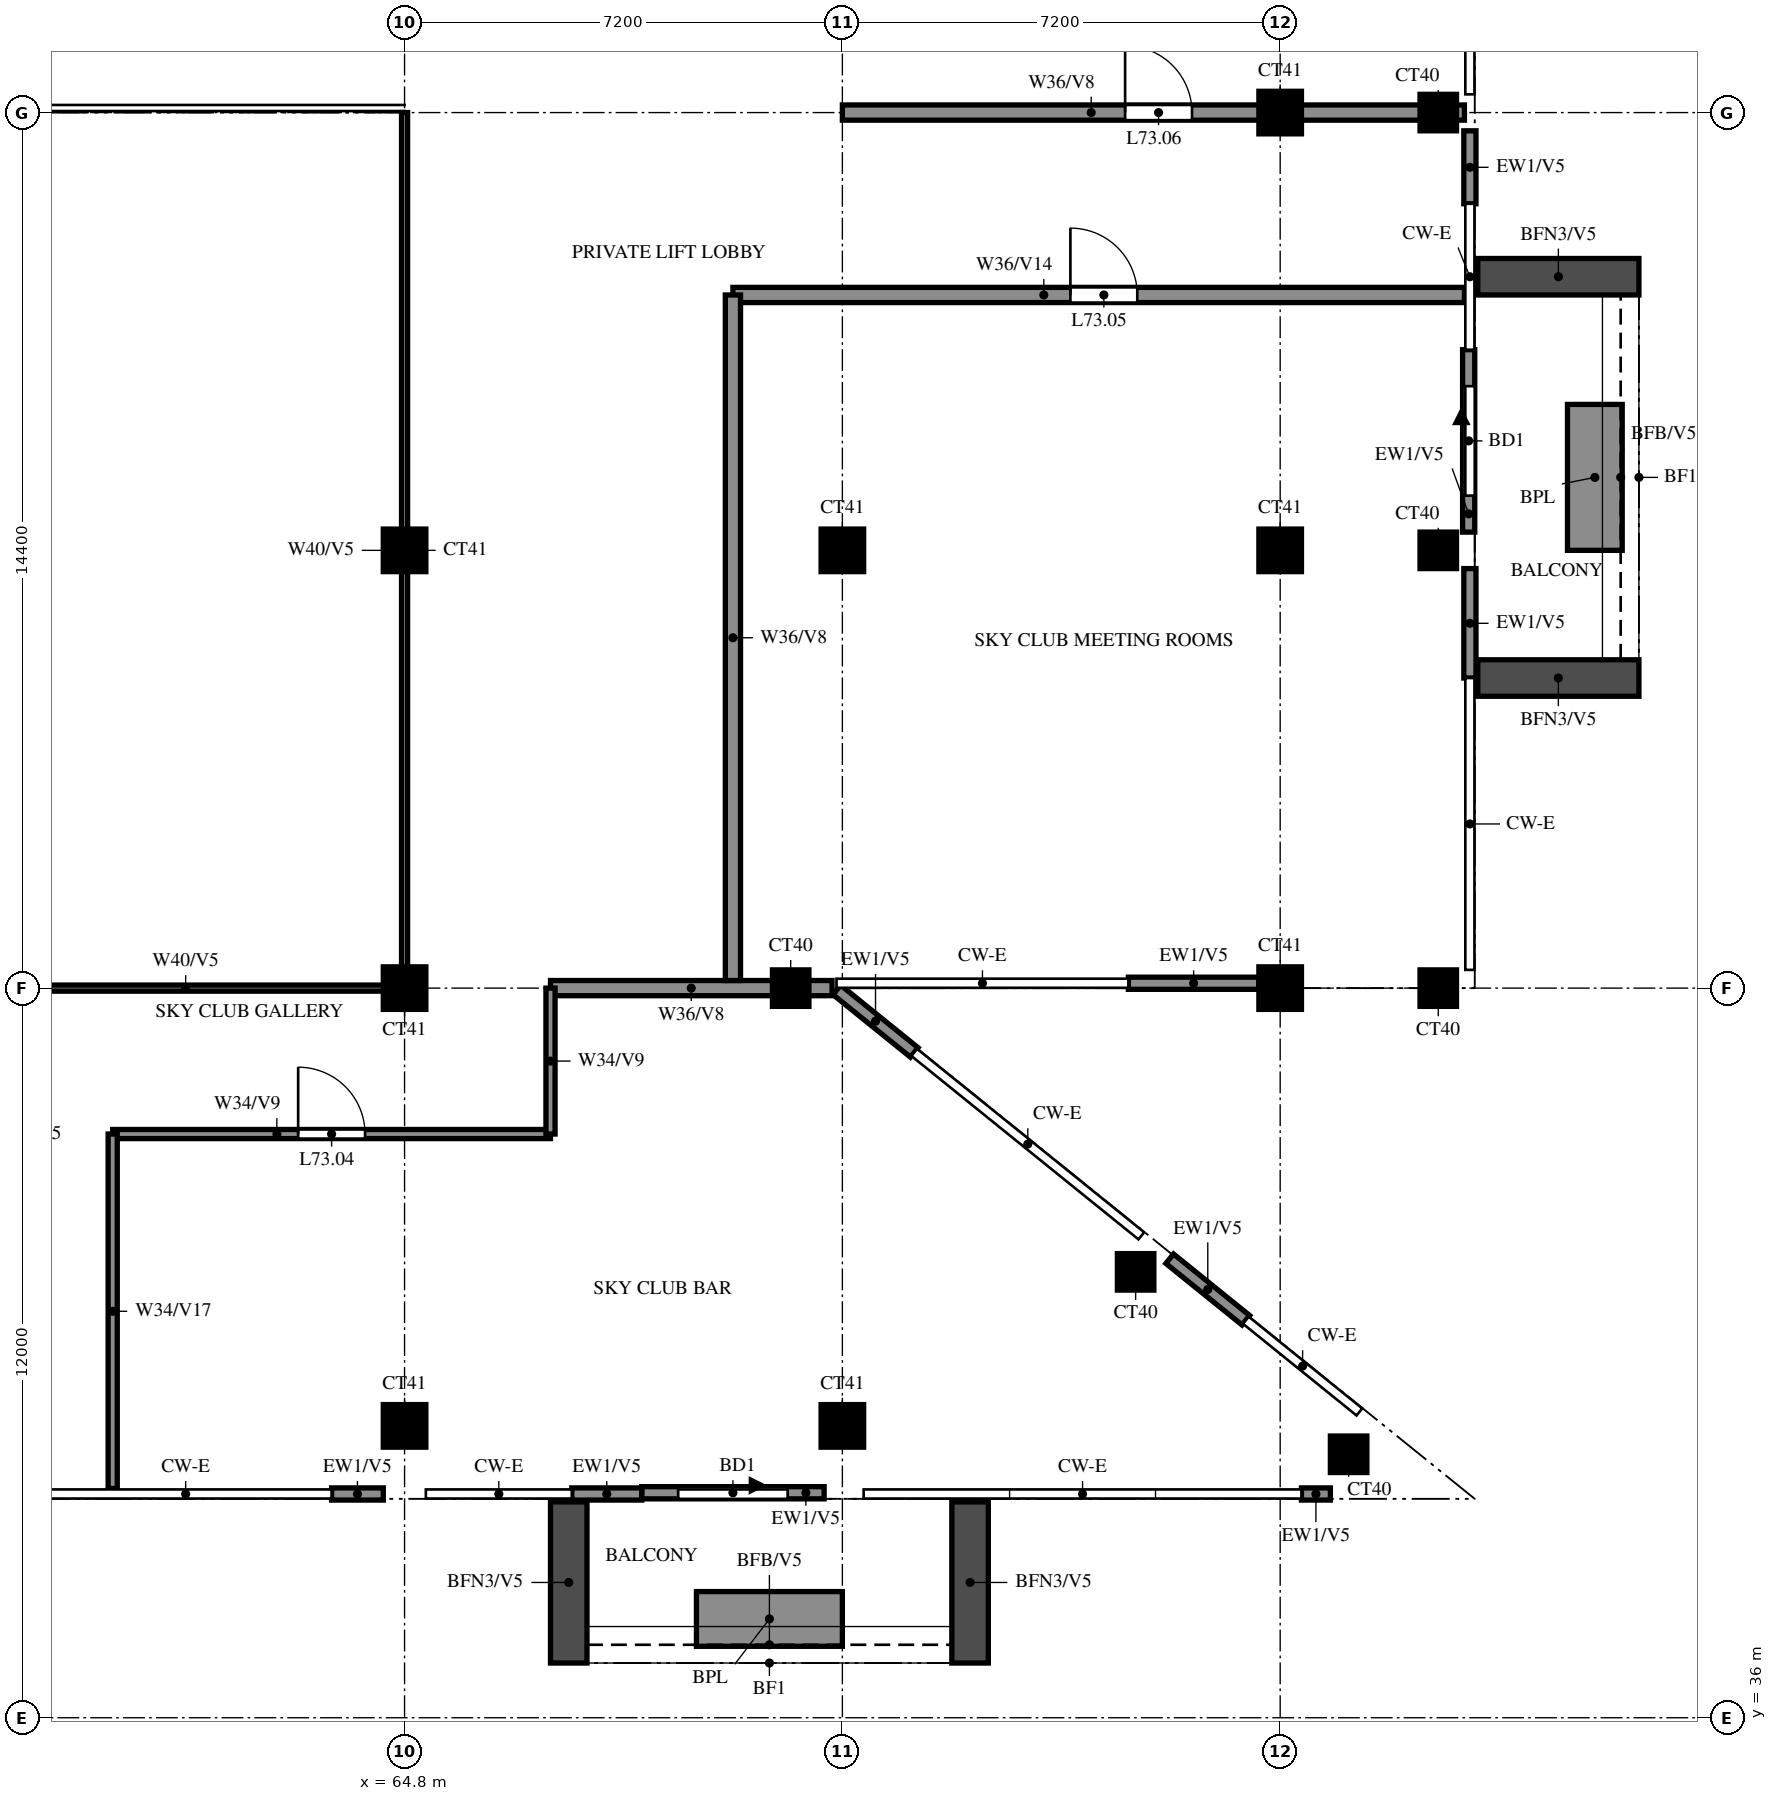
"""IFC4 building model, lengths in metres.
Left out: names, types, materials, properties, quantities, classifications, styles, units other than length and angle.
Written with IfcOpenShell. Run it as: python <this file> out.ifc"""

import sys

from ifc_helpers import new_model, si_unit, direction, frame, frame_2d, origin, origin_2d, place, context, subcontext, project, spatial, rectangle, extrude, source, transform, mapped, element, fill, save


model = new_model("IFC4")
c1 = context("Model", 3, precision=1e-05, world=origin(), true_north=direction((0.0, 1.0)))
c2 = subcontext(c1, "Body", "Model", "MODEL_VIEW")
j1 = project(units=[si_unit("LENGTHUNIT", "METRE"), si_unit("PLANEANGLEUNIT", "RADIAN")], contexts=[c1])
p1 = place(None, origin())
s1 = spatial("IfcSite", under=j1, at=p1, CompositionType="ELEMENT")
p2 = place(p1, origin())
s2 = spatial("IfcBuilding", under=s1, at=p2, CompositionType="ELEMENT")
p3 = place(p2, frame((0.0, 0.0, 271.0)))
s3 = spatial("IfcBuildingStorey", under=s2, at=p3, CompositionType="ELEMENT", Elevation=271.0)
m1 = source(origin(), c2, "Body", "SweptSolid", [
    extrude(rectangle(XDim=0.6, YDim=0.6, at=origin_2d()), origin(), (0.0, 0.0, 1.0), 3.15),
])
p4 = place(p3, frame((80.326, 40.333, 0.0), z_axis=(0.0, 0.0, 1.0), x_axis=(1.0, 0.0, 0.0)))
e1 = element("IfcColumn", 1, at=p4, inside=s3, PredefinedType="COLUMN", context=c2, shape_type="MappedRepresentation", body=[
    mapped(m1, transform((0.0, 0.0, 0.0))),
])
m2 = source(origin(), c2, "Body", "SweptSolid", [
    extrude(rectangle(XDim=0.7, YDim=0.7, at=origin_2d()), origin(), (0.0, 0.0, 1.0), 3.15),
])
for number, where, z_axis, x_axis in (
    (2, (64.8, 40.8, 0.0), (0.0, 0.0, 1.0), (1.0, 0.0, 0.0)),
    (3, (72.0, 40.8, 0.0), (0.0, 0.0, 1.0), (1.0, 0.0, 0.0)),
):
    element("IfcColumn", number, at=place(p3, frame(where, z_axis=z_axis, x_axis=x_axis)), inside=s3, PredefinedType="COLUMN", context=c2, shape_type="MappedRepresentation", body=[
        mapped(m2, transform((0.0, 0.0, 0.0))),
    ])
p5 = place(p3, frame((76.823, 43.333, 0.0), z_axis=(0.0, 0.0, 1.0), x_axis=(1.0, 0.0, 0.0)))
e4 = element("IfcColumn", 4, at=p5, inside=s3, PredefinedType="COLUMN", context=c2, shape_type="MappedRepresentation", body=[
    mapped(m1, transform((0.0, 0.0, 0.0))),
])
p6 = place(p3, frame((64.8, 48.0, 0.0), z_axis=(0.0, 0.0, 1.0), x_axis=(1.0, 0.0, 0.0)))
e5 = element("IfcColumn", 5, at=p6, inside=s3, PredefinedType="COLUMN", context=c2, shape_type="MappedRepresentation", body=[
    mapped(m2, transform((0.0, 0.0, 0.0))),
])
p7 = place(p3, frame((71.15, 48.0, 0.0), z_axis=(0.0, 0.0, 1.0), x_axis=(1.0, 0.0, 0.0)))
e6 = element("IfcColumn", 6, at=p7, inside=s3, PredefinedType="COLUMN", context=c2, shape_type="MappedRepresentation", body=[
    mapped(m1, transform((0.0, 0.0, 0.0))),
])
p8 = place(p3, frame((79.2, 48.0, 0.0), z_axis=(0.0, 0.0, 1.0), x_axis=(1.0, 0.0, 0.0)))
e7 = element("IfcColumn", 7, at=p8, inside=s3, PredefinedType="COLUMN", context=c2, shape_type="MappedRepresentation", body=[
    mapped(m2, transform((0.0, 0.0, 0.0))),
])
p9 = place(p3, frame((81.8, 48.0, 0.0), z_axis=(0.0, 0.0, 1.0), x_axis=(1.0, 0.0, 0.0)))
e8 = element("IfcColumn", 8, at=p9, inside=s3, PredefinedType="COLUMN", context=c2, shape_type="MappedRepresentation", body=[
    mapped(m1, transform((0.0, 0.0, 0.0))),
])
for number, where, z_axis, x_axis in (
    (9, (64.8, 55.2, 0.0), (0.0, 0.0, 1.0), (1.0, 0.0, 0.0)),
    (10, (72.0, 55.2, 0.0), (0.0, 0.0, 1.0), (1.0, 0.0, 0.0)),
    (11, (79.2, 55.2, 0.0), (0.0, 0.0, 1.0), (1.0, 0.0, 0.0)),
):
    element("IfcColumn", number, at=place(p3, frame(where, z_axis=z_axis, x_axis=x_axis)), inside=s3, PredefinedType="COLUMN", context=c2, shape_type="MappedRepresentation", body=[
        mapped(m2, transform((0.0, 0.0, 0.0))),
    ])
p10 = place(p3, frame((81.8, 55.2, 0.0), z_axis=(0.0, 0.0, 1.0), x_axis=(1.0, 0.0, 0.0)))
e12 = element("IfcColumn", 12, at=p10, inside=s3, PredefinedType="COLUMN", context=c2, shape_type="MappedRepresentation", body=[
    mapped(m1, transform((0.0, 0.0, 0.0))),
])
p11 = place(p3, frame((79.2, 62.4, 0.0), z_axis=(0.0, 0.0, 1.0), x_axis=(1.0, 0.0, 0.0)))
e13 = element("IfcColumn", 13, at=p11, inside=s3, PredefinedType="COLUMN", context=c2, shape_type="MappedRepresentation", body=[
    mapped(m2, transform((0.0, 0.0, 0.0))),
])
p12 = place(p3, frame((81.8, 62.4, 0.0), z_axis=(0.0, 0.0, 1.0), x_axis=(1.0, 0.0, 0.0)))
e14 = element("IfcColumn", 14, at=p12, inside=s3, PredefinedType="COLUMN", context=c2, shape_type="MappedRepresentation", body=[
    mapped(m1, transform((0.0, 0.0, 0.0))),
])
p13 = place(p3, frame((78.635, 42.538, 0.0), z_axis=(0.0, 0.0, 1.0), x_axis=(-0.777901266838, 0.628386520425, 0.0)))
e15 = element("IfcWall", 15, at=p13, inside=s3, PredefinedType="SOLIDWALL", context=c2, shape_type="SweptSolid", body=[
    extrude(rectangle(XDim=1.61, YDim=0.2, at=frame_2d((0.805, 0.0))), origin(), (0.0, 0.0, 1.0), 3.15),
])
p14 = place(p3, frame((73.182, 46.942, 0.0), z_axis=(0.0, 0.0, 1.0), x_axis=(-0.777921556204, 0.628361402692, 0.0)))
e16 = element("IfcWall", 16, at=p14, inside=s3, PredefinedType="SOLIDWALL", context=c2, shape_type="SweptSolid", body=[
    extrude(rectangle(XDim=1.637, YDim=0.2, at=frame_2d((0.819, 0.0))), origin(), (0.0, 0.0, 1.0), 3.15),
])
p15 = place(p3, frame((76.704, 48.08, 0.0), z_axis=(0.0, 0.0, 1.0), x_axis=(1.0, 0.0, 0.0)))
e17 = element("IfcWall", 17, at=p15, inside=s3, PredefinedType="SOLIDWALL", context=c2, shape_type="SweptSolid", body=[
    extrude(rectangle(XDim=2.146, YDim=0.2, at=frame_2d((1.073, 0.0))), origin(), (0.0, 0.0, 1.0), 3.15),
])
p16 = place(p3, frame((82.3, 55.5, 0.0), z_axis=(0.0, 0.0, 1.0), x_axis=(0.0, 1.0, 0.0)))
e18 = element("IfcWall", 18, at=p16, inside=s3, PredefinedType="SOLIDWALL", context=c2, shape_type="SweptSolid", body=[
    extrude(rectangle(XDim=3.0, YDim=0.2, at=frame_2d((1.5, 0.0))), origin(), (0.0, 0.0, 1.0), 3.15),
])
p17 = place(p16, frame((0.6, 0.0, 0.0)))
e19 = element("IfcOpeningElement", 19, at=p17, cuts=e18, PredefinedType="OPENING", context=c2, shape_type="SweptSolid", body=[
    extrude(rectangle(XDim=1.8, YDim=2.4, at=frame_2d((0.9, 1.2))), frame((0.0, 0.11, 0.0), z_axis=(0.0, -1.0, 0.0), x_axis=(1.0, 0.0, 0.0)), (0.0, 0.0, 1.0), 0.22),
])
p18 = place(p3, frame((82.32, 53.1, 0.0), z_axis=(0.0, 0.0, 1.0), x_axis=(0.0, 1.0, 0.0)))
e20 = element("IfcWall", 20, at=p18, inside=s3, PredefinedType="SOLIDWALL", context=c2, shape_type="SweptSolid", body=[
    extrude(rectangle(XDim=1.8, YDim=0.2, at=frame_2d((0.9, 0.0))), origin(), (0.0, 0.0, 1.0), 3.15),
])
p19 = place(p3, frame((82.32, 60.9, 0.0), z_axis=(0.0, 0.0, 1.0), x_axis=(0.0, 1.0, 0.0)))
e21 = element("IfcWall", 21, at=p19, inside=s3, PredefinedType="SOLIDWALL", context=c2, shape_type="SweptSolid", body=[
    extrude(rectangle(XDim=1.2, YDim=0.2, at=frame_2d((0.6, 0.0))), origin(), (0.0, 0.0, 1.0), 3.15),
])
p20 = place(p3, frame((68.7, 39.7, 0.0), z_axis=(0.0, 0.0, 1.0), x_axis=(1.0, 0.0, 0.0)))
e22 = element("IfcWall", 22, at=p20, inside=s3, PredefinedType="SOLIDWALL", context=c2, shape_type="SweptSolid", body=[
    extrude(rectangle(XDim=3.0, YDim=0.2, at=frame_2d((1.5, 0.0))), origin(), (0.0, 0.0, 1.0), 3.15),
])
p21 = place(p20, frame((0.6, 0.0, 0.0)))
e23 = element("IfcOpeningElement", 23, at=p21, cuts=e22, PredefinedType="OPENING", context=c2, shape_type="SweptSolid", body=[
    extrude(rectangle(XDim=1.8, YDim=2.4, at=frame_2d((0.9, 1.2))), frame((0.0, 0.11, 0.0), z_axis=(0.0, -1.0, 0.0), x_axis=(1.0, 0.0, 0.0)), (0.0, 0.0, 1.0), 0.22),
])
p22 = place(p3, frame((63.6, 39.68, 0.0), z_axis=(0.0, 0.0, 1.0), x_axis=(1.0, 0.0, 0.0)))
e24 = element("IfcWall", 24, at=p22, inside=s3, PredefinedType="SOLIDWALL", context=c2, shape_type="SweptSolid", body=[
    extrude(rectangle(XDim=0.85, YDim=0.2, at=frame_2d((0.425, 0.0))), origin(), (0.0, 0.0, 1.0), 3.15),
])
p23 = place(p3, frame((67.55, 39.68, 0.0), z_axis=(0.0, 0.0, 1.0), x_axis=(1.0, 0.0, 0.0)))
e25 = element("IfcWall", 25, at=p23, inside=s3, PredefinedType="SOLIDWALL", context=c2, shape_type="SweptSolid", body=[
    extrude(rectangle(XDim=1.15, YDim=0.2, at=frame_2d((0.575, 0.0))), origin(), (0.0, 0.0, 1.0), 3.15),
])
p24 = place(p3, frame((79.55, 39.68, 0.0), z_axis=(0.0, 0.0, 1.0), x_axis=(1.0, 0.0, 0.0)))
e26 = element("IfcWall", 26, at=p24, inside=s3, PredefinedType="SOLIDWALL", context=c2, shape_type="SweptSolid", body=[
    extrude(rectangle(XDim=0.476, YDim=0.2, at=frame_2d((0.238, 0.0))), origin(), (0.0, 0.0, 1.0), 3.15),
])
for number, where, z_axis, x_axis in (
    (27, (82.45, 53.1, 0.0), (0.0, 0.0, 1.0), (1.0, 0.0, 0.0)),
    (28, (82.45, 59.7, 0.0), (0.0, 0.0, 1.0), (1.0, 0.0, 0.0)),
):
    element("IfcWall", number, at=place(p3, frame(where, z_axis=z_axis, x_axis=x_axis)), inside=s3, PredefinedType="SOLIDWALL", context=c2, shape_type="SweptSolid", body=[
        extrude(rectangle(XDim=2.65, YDim=0.6, at=frame_2d((1.325, 0.0))), origin(), (0.0, 0.0, 1.0), 2.901),
    ])
p25 = place(p3, frame((84.375, 55.2, 0.0), z_axis=(0.0, 0.0, 1.0), x_axis=(0.0, 1.0, 0.0)))
e29 = element("IfcWall", 29, at=p25, inside=s3, PredefinedType="SOLIDWALL", context=c2, shape_type="SweptSolid", body=[
    extrude(rectangle(XDim=2.4, YDim=0.9, at=frame_2d((1.2, 0.0))), origin(), (0.0, 0.0, 1.0), 0.9),
])
for number, where, z_axis, x_axis in (
    (30, (67.5, 39.55, 0.0), (0.0, 0.0, 1.0), (0.0, -1.0, 0.0)),
    (31, (74.1, 39.55, 0.0), (0.0, 0.0, 1.0), (0.0, -1.0, 0.0)),
):
    element("IfcWall", number, at=place(p3, frame(where, z_axis=z_axis, x_axis=x_axis)), inside=s3, PredefinedType="SOLIDWALL", context=c2, shape_type="SweptSolid", body=[
        extrude(rectangle(XDim=2.65, YDim=0.6, at=frame_2d((1.325, 0.0))), origin(), (0.0, 0.0, 1.0), 2.901),
    ])
p26 = place(p3, frame((69.6, 37.625, 0.0), z_axis=(0.0, 0.0, 1.0), x_axis=(1.0, 0.0, 0.0)))
e32 = element("IfcWall", 32, at=p26, inside=s3, PredefinedType="SOLIDWALL", context=c2, shape_type="SweptSolid", body=[
    extrude(rectangle(XDim=2.4, YDim=0.9, at=frame_2d((1.2, 0.0))), origin(), (0.0, 0.0, 1.0), 0.9),
])
p27 = place(p3, frame((60.0, 45.6, 0.0), z_axis=(0.0, 0.0, 1.0), x_axis=(1.0, 0.0, 0.0)))
e33 = element("IfcWall", 33, at=p27, inside=s3, PredefinedType="PARTITIONING", context=c2, shape_type="SweptSolid", body=[
    extrude(rectangle(XDim=7.2, YDim=0.15, at=frame_2d((3.6, 0.0))), origin(), (0.0, 0.0, 1.0), 3.15),
])
p28 = place(p27, frame((3.05, 0.0, 0.0)))
e34 = element("IfcOpeningElement", 34, at=p28, cuts=e33, PredefinedType="OPENING", context=c2, shape_type="SweptSolid", body=[
    extrude(rectangle(XDim=1.1, YDim=2.1, at=frame_2d((0.55, 1.05))), frame((0.0, 0.085, 0.0), z_axis=(0.0, -1.0, 0.0), x_axis=(1.0, 0.0, 0.0)), (0.0, 0.0, 1.0), 0.17),
])
p29 = place(p3, frame((57.6, 48.0, 0.0), z_axis=(0.0, 0.0, 1.0), x_axis=(1.0, 0.0, 0.0)))
e35 = element("IfcWall", 35, at=p29, inside=s3, PredefinedType="PARTITIONING", context=c2, shape_type="SweptSolid", body=[
    extrude(rectangle(XDim=7.2, YDim=0.1, at=frame_2d((3.6, 0.0))), origin(), (0.0, 0.0, 1.0), 2.25),
])
p30 = place(p3, frame((67.2, 48.0, 0.0), z_axis=(0.0, 0.0, 1.0), x_axis=(1.0, 0.0, 0.0)))
e36 = element("IfcWall", 36, at=p30, inside=s3, PredefinedType="SOLIDWALL", context=c2, shape_type="SweptSolid", body=[
    extrude(rectangle(XDim=4.63, YDim=0.25, at=frame_2d((2.315, 0.0))), origin(), (0.0, 0.0, 1.0), 3.15),
])
p31 = place(p3, frame((70.2, 59.4, 0.0), z_axis=(0.0, 0.0, 1.0), x_axis=(1.0, 0.0, 0.0)))
e37 = element("IfcWall", 37, at=p31, inside=s3, PredefinedType="SOLIDWALL", context=c2, shape_type="SweptSolid", body=[
    extrude(rectangle(XDim=12.03, YDim=0.25, at=frame_2d((6.015, 0.0))), origin(), (0.0, 0.0, 1.0), 2.25),
])
p32 = place(p31, frame((5.55, 0.0, 0.0)))
e38 = element("IfcOpeningElement", 38, at=p32, cuts=e37, PredefinedType="OPENING", context=c2, shape_type="SweptSolid", body=[
    extrude(rectangle(XDim=1.1, YDim=2.1, at=frame_2d((0.55, 1.05))), frame((0.0, 0.135, 0.0), z_axis=(0.0, -1.0, 0.0), x_axis=(1.0, 0.0, 0.0)), (0.0, 0.0, 1.0), 0.27),
])
p33 = place(p3, frame((72.0, 62.4, 0.0), z_axis=(0.0, 0.0, 1.0), x_axis=(1.0, 0.0, 0.0)))
e39 = element("IfcWall", 39, at=p33, inside=s3, PredefinedType="SOLIDWALL", context=c2, shape_type="SweptSolid", body=[
    extrude(rectangle(XDim=10.23, YDim=0.25, at=frame_2d((5.115, 0.0))), origin(), (0.0, 0.0, 1.0), 3.15),
])
p34 = place(p33, frame((4.65, 0.0, 0.0)))
e40 = element("IfcOpeningElement", 40, at=p34, cuts=e39, PredefinedType="OPENING", context=c2, shape_type="SweptSolid", body=[
    extrude(rectangle(XDim=1.1, YDim=2.1, at=frame_2d((0.55, 1.05))), frame((0.0, 0.135, 0.0), z_axis=(0.0, -1.0, 0.0), x_axis=(1.0, 0.0, 0.0)), (0.0, 0.0, 1.0), 0.27),
])
p35 = place(p3, frame((60.0, 39.77, 0.0), z_axis=(0.0, 0.0, 1.0), x_axis=(0.0, 1.0, 0.0)))
e41 = element("IfcWall", 41, at=p35, inside=s3, PredefinedType="PARTITIONING", context=c2, shape_type="SweptSolid", body=[
    extrude(rectangle(XDim=5.83, YDim=0.15, at=frame_2d((2.915, 0.0))), origin(), (0.0, 0.0, 1.0), 2.2),
])
p36 = place(p3, frame((64.8, 48.0, 0.0), z_axis=(0.0, 0.0, 1.0), x_axis=(0.0, 1.0, 0.0)))
e42 = element("IfcWall", 42, at=p36, inside=s3, PredefinedType="PARTITIONING", context=c2, shape_type="SweptSolid", body=[
    extrude(rectangle(XDim=14.4, YDim=0.1, at=frame_2d((7.2, 0.0))), origin(), (0.0, 0.0, 1.0), 2.25),
])
p37 = place(p3, frame((67.2, 45.6, 0.0), z_axis=(0.0, 0.0, 1.0), x_axis=(0.0, 1.0, 0.0)))
e43 = element("IfcWall", 43, at=p37, inside=s3, PredefinedType="PARTITIONING", context=c2, shape_type="SweptSolid", body=[
    extrude(rectangle(XDim=2.4, YDim=0.15, at=frame_2d((1.2, 0.0))), origin(), (0.0, 0.0, 1.0), 3.15),
])
p38 = place(p3, frame((70.2, 48.125, 0.0), z_axis=(0.0, 0.0, 1.0), x_axis=(0.0, 1.0, 0.0)))
e44 = element("IfcWall", 44, at=p38, inside=s3, PredefinedType="SOLIDWALL", context=c2, shape_type="SweptSolid", body=[
    extrude(rectangle(XDim=11.275, YDim=0.25, at=frame_2d((5.637, 0.0))), origin(), (0.0, 0.0, 1.0), 3.15),
])
p39 = place(p17, origin())
e45 = element("IfcDoor", 45, at=p39, inside=s3, OperationType="DOUBLE_DOOR_SLIDING", PredefinedType="DOOR", context=c2, shape_type="SweptSolid", body=[
    extrude(rectangle(XDim=1.8, YDim=2.4, at=frame_2d((0.9, 1.2))), frame((0.0, 0.025, 0.0), z_axis=(0.0, -1.0, 0.0), x_axis=(1.0, 0.0, 0.0)), (0.0, 0.0, 1.0), 0.05),
])
fill(e19, e45)
p40 = place(p21, origin())
e46 = element("IfcDoor", 46, at=p40, inside=s3, OperationType="DOUBLE_DOOR_SLIDING", PredefinedType="DOOR", context=c2, shape_type="SweptSolid", body=[
    extrude(rectangle(XDim=1.8, YDim=2.4, at=frame_2d((0.9, 1.2))), frame((0.0, 0.025, 0.0), z_axis=(0.0, -1.0, 0.0), x_axis=(1.0, 0.0, 0.0)), (0.0, 0.0, 1.0), 0.05),
])
fill(e23, e46)
p41 = place(p28, origin())
e47 = element("IfcDoor", 47, at=p41, inside=s3, OperationType="SINGLE_SWING_RIGHT", PredefinedType="DOOR", context=c2, shape_type="SweptSolid", body=[
    extrude(rectangle(XDim=1.1, YDim=2.1, at=frame_2d((0.55, 1.05))), frame((0.0, 0.025, 0.0), z_axis=(0.0, -1.0, 0.0), x_axis=(1.0, 0.0, 0.0)), (0.0, 0.0, 1.0), 0.05),
])
fill(e34, e47)
p42 = place(p32, origin())
e48 = element("IfcDoor", 48, at=p42, inside=s3, OperationType="SINGLE_SWING_RIGHT", PredefinedType="DOOR", context=c2, shape_type="SweptSolid", body=[
    extrude(rectangle(XDim=1.1, YDim=2.1, at=frame_2d((0.55, 1.05))), frame((0.0, 0.025, 0.0), z_axis=(0.0, -1.0, 0.0), x_axis=(1.0, 0.0, 0.0)), (0.0, 0.0, 1.0), 0.05),
])
fill(e38, e48)
p43 = place(p34, origin())
e49 = element("IfcDoor", 49, at=p43, inside=s3, OperationType="SINGLE_SWING_RIGHT", PredefinedType="DOOR", context=c2, shape_type="SweptSolid", body=[
    extrude(rectangle(XDim=1.1, YDim=2.1, at=frame_2d((0.55, 1.05))), frame((0.0, 0.025, 0.0), z_axis=(0.0, -1.0, 0.0), x_axis=(1.0, 0.0, 0.0)), (0.0, 0.0, 1.0), 0.05),
])
fill(e40, e49)
save(model, sys.argv[1])
